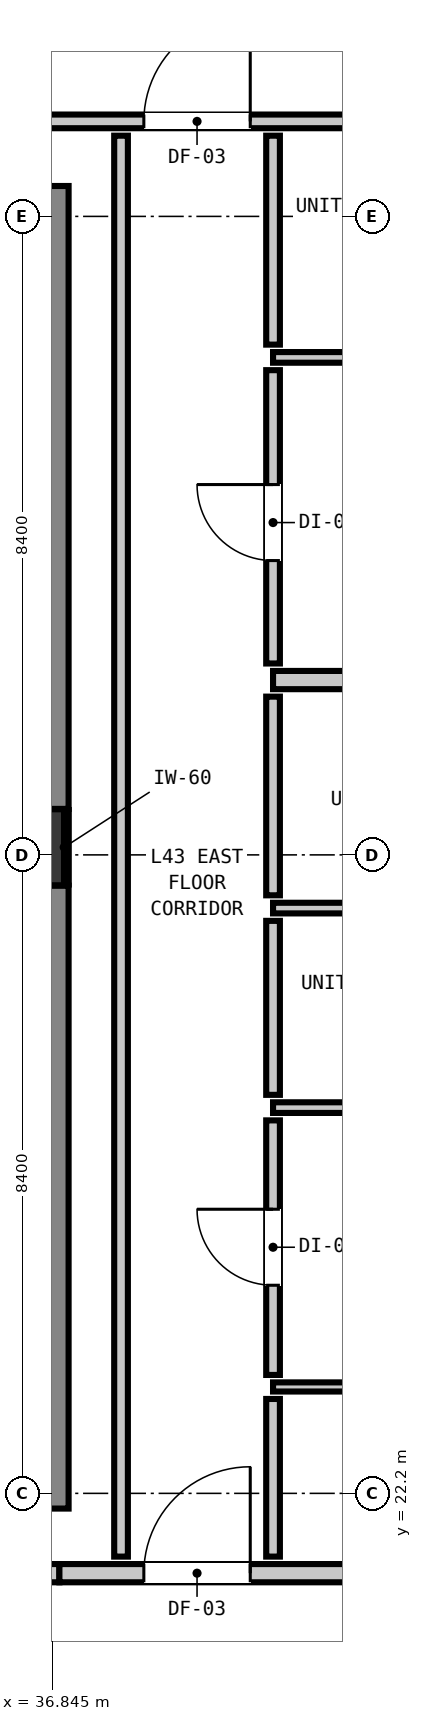
"""IFC4 building model, lengths in metres.
Left out: names, types, materials, properties, quantities, classifications, styles, units other than length and angle.
Written with IfcOpenShell. Run it as: python <this file> out.ifc"""

import sys

from ifc_helpers import new_model, si_unit, direction, frame, frame_2d, origin, origin_2d, place, context, subcontext, project, spatial, rectangle, extrude, element, fill, save


model = new_model("IFC4")
c1 = context("Model", 3, precision=1e-05, world=origin(), true_north=direction((0.0, 1.0)))
c2 = subcontext(c1, "Body", "Model", "MODEL_VIEW")
j1 = project(units=[si_unit("LENGTHUNIT", "METRE"), si_unit("PLANEANGLEUNIT", "RADIAN")], contexts=[c1])
p1 = place(None, origin())
s1 = spatial("IfcSite", under=j1, at=p1, CompositionType="ELEMENT")
p2 = place(p1, origin())
s2 = spatial("IfcBuilding", under=s1, at=p2, CompositionType="ELEMENT")
p3 = place(p2, frame((0.0, 0.0, 149.24)))
s3 = spatial("IfcBuildingStorey", under=s2, at=p3, CompositionType="ELEMENT", Elevation=149.24)
p4 = place(p3, frame((36.5, 30.7, 0.0), z_axis=(0.0, 0.0, 1.0), x_axis=(1.0, 0.0, 0.0)))
e1 = element("IfcColumn", 1, at=p4, inside=s3, PredefinedType="COLUMN", context=c2, shape_type="SweptSolid", body=[
    extrude(rectangle(XDim=1.0, YDim=1.0, at=origin_2d()), origin(), (0.0, 0.0, 1.0), 3.32),
])
p5 = place(p3, frame((36.56, 22.0, 0.0), z_axis=(0.0, 0.0, 1.0), x_axis=(0.0, 1.0, 0.0)))
e2 = element("IfcWall", 2, at=p5, inside=s3, PredefinedType="SHEAR", context=c2, shape_type="SweptSolid", body=[
    extrude(rectangle(XDim=8.195, YDim=1.0, at=frame_2d((4.098, 0.0))), origin(), (0.0, 0.0, 1.0), 3.32),
])
p6 = place(p3, frame((36.56, 31.205, 0.0), z_axis=(0.0, 0.0, 1.0), x_axis=(0.0, 1.0, 0.0)))
e3 = element("IfcWall", 3, at=p6, inside=s3, PredefinedType="SHEAR", context=c2, shape_type="SweptSolid", body=[
    extrude(rectangle(XDim=8.195, YDim=1.0, at=frame_2d((4.097, 0.0))), origin(), (0.0, 0.0, 1.0), 3.32),
])
p7 = place(p3, frame((9.407, 21.15, 0.0), z_axis=(0.0, 0.0, 1.0), x_axis=(1.0, 0.0, 0.0)))
e4 = element("IfcWall", 4, at=p7, inside=s3, PredefinedType="PARTITIONING", context=c2, shape_type="SweptSolid", body=[
    extrude(rectangle(XDim=27.532, YDim=0.24, at=frame_2d((13.766, 0.0))), origin(), (0.0, 0.0, 1.0), 3.08),
])
p8 = place(p7, frame((8.803, 0.0, 0.0)))
e5 = element("IfcOpeningElement", 5, at=p8, cuts=e4, PredefinedType="OPENING", context=c2, shape_type="SweptSolid", body=[
    extrude(rectangle(XDim=1.1, YDim=2.15, at=frame_2d((0.55, 1.075))), frame((0.0, 0.13, 0.0), z_axis=(0.0, -1.0, 0.0), x_axis=(1.0, 0.0, 0.0)), (0.0, 0.0, 1.0), 0.26),
])
p9 = place(p7, frame((1.192, 0.0, 0.0)))
e6 = element("IfcOpeningElement", 6, at=p9, cuts=e4, PredefinedType="OPENING", context=c2, shape_type="SweptSolid", body=[
    extrude(rectangle(XDim=1.4, YDim=2.15, at=frame_2d((0.7, 1.075))), frame((0.0, 0.13, 0.0), z_axis=(0.0, -1.0, 0.0), x_axis=(1.0, 0.0, 0.0)), (0.0, 0.0, 1.0), 0.26),
])
p10 = place(p3, frame((36.939, 21.15, 0.0), z_axis=(0.0, 0.0, 1.0), x_axis=(1.0, 0.0, 0.0)))
e7 = element("IfcWall", 7, at=p10, inside=s3, PredefinedType="PARTITIONING", context=c2, shape_type="SweptSolid", body=[
    extrude(rectangle(XDim=10.972, YDim=0.24, at=frame_2d((5.486, 0.0))), origin(), (0.0, 0.0, 1.0), 2.565),
])
p11 = place(p10, frame((1.111, 0.0, 0.0)))
e8 = element("IfcOpeningElement", 8, at=p11, cuts=e7, PredefinedType="OPENING", context=c2, shape_type="SweptSolid", body=[
    extrude(rectangle(XDim=1.4, YDim=2.15, at=frame_2d((0.7, 1.075))), frame((0.0, 0.13, 0.0), z_axis=(0.0, -1.0, 0.0), x_axis=(1.0, 0.0, 0.0)), (0.0, 0.0, 1.0), 0.26),
])
p12 = place(p3, frame((39.75, 32.9, 0.0), z_axis=(0.0, 0.0, 1.0), x_axis=(1.0, 0.0, 0.0)))
e9 = element("IfcWall", 9, at=p12, inside=s3, PredefinedType="PARTITIONING", context=c2, shape_type="SweptSolid", body=[
    extrude(rectangle(XDim=9.043, YDim=0.24, at=frame_2d((4.521, 0.0))), origin(), (0.0, 0.0, 1.0), 3.08),
])
p13 = place(p12, frame((4.075, 0.0, 0.0)))
e10 = element("IfcOpeningElement", 10, at=p13, cuts=e9, PredefinedType="OPENING", context=c2, shape_type="SweptSolid", body=[
    extrude(rectangle(XDim=0.9, YDim=2.1, at=frame_2d((0.45, 1.05))), frame((0.0, 0.13, 0.0), z_axis=(0.0, -1.0, 0.0), x_axis=(1.0, 0.0, 0.0)), (0.0, 0.0, 1.0), 0.26),
])
p14 = place(p3, frame((9.407, 40.25, 0.0), z_axis=(0.0, 0.0, 1.0), x_axis=(1.0, 0.0, 0.0)))
e11 = element("IfcWall", 11, at=p14, inside=s3, PredefinedType="PARTITIONING", context=c2, shape_type="SweptSolid", body=[
    extrude(rectangle(XDim=39.386, YDim=0.18, at=frame_2d((19.693, 0.0))), origin(), (0.0, 0.0, 1.0), 3.08),
])
p15 = place(p14, frame((8.028, 0.0, 0.0)))
e12 = element("IfcOpeningElement", 12, at=p15, cuts=e11, PredefinedType="OPENING", context=c2, shape_type="SweptSolid", body=[
    extrude(rectangle(XDim=1.4, YDim=2.15, at=frame_2d((0.7, 1.075))), frame((0.0, 0.1, 0.0), z_axis=(0.0, -1.0, 0.0), x_axis=(1.0, 0.0, 0.0)), (0.0, 0.0, 1.0), 0.2),
])
p16 = place(p14, frame((1.192, 0.0, 0.0)))
e13 = element("IfcOpeningElement", 13, at=p16, cuts=e11, PredefinedType="OPENING", context=c2, shape_type="SweptSolid", body=[
    extrude(rectangle(XDim=1.4, YDim=2.15, at=frame_2d((0.7, 1.075))), frame((0.0, 0.1, 0.0), z_axis=(0.0, -1.0, 0.0), x_axis=(1.0, 0.0, 0.0)), (0.0, 0.0, 1.0), 0.2),
])
p17 = place(p14, frame((28.643, 0.0, 0.0)))
e14 = element("IfcOpeningElement", 14, at=p17, cuts=e11, PredefinedType="OPENING", context=c2, shape_type="SweptSolid", body=[
    extrude(rectangle(XDim=1.4, YDim=2.15, at=frame_2d((0.7, 1.075))), frame((0.0, 0.1, 0.0), z_axis=(0.0, -1.0, 0.0), x_axis=(1.0, 0.0, 0.0)), (0.0, 0.0, 1.0), 0.2),
])
p18 = place(p3, frame((39.75, 27.275, 0.0), z_axis=(0.0, 0.0, 1.0), x_axis=(1.0, 0.0, 0.0)))
e15 = element("IfcWall", 15, at=p18, inside=s3, PredefinedType="PARTITIONING", context=c2, shape_type="SweptSolid", body=[
    extrude(rectangle(XDim=9.043, YDim=0.14, at=frame_2d((4.521, 0.0))), origin(), (0.0, 0.0, 1.0), 3.08),
])
p19 = place(p18, frame((1.708, 0.0, 0.0)))
e16 = element("IfcOpeningElement", 16, at=p19, cuts=e15, PredefinedType="OPENING", context=c2, shape_type="SweptSolid", body=[
    extrude(rectangle(XDim=0.86, YDim=2.02, at=frame_2d((0.43, 1.01))), frame((0.0, 0.08, 0.0), z_axis=(0.0, -1.0, 0.0), x_axis=(1.0, 0.0, 0.0)), (0.0, 0.0, 1.0), 0.16),
])
p20 = place(p18, frame((6.187, 0.0, 0.0)))
e17 = element("IfcOpeningElement", 17, at=p20, cuts=e15, PredefinedType="OPENING", context=c2, shape_type="SweptSolid", body=[
    extrude(rectangle(XDim=0.9, YDim=2.1, at=frame_2d((0.45, 1.05))), frame((0.0, 0.08, 0.0), z_axis=(0.0, -1.0, 0.0), x_axis=(1.0, 0.0, 0.0)), (0.0, 0.0, 1.0), 0.16),
])
p21 = place(p3, frame((39.75, 29.9, 0.0), z_axis=(0.0, 0.0, 1.0), x_axis=(1.0, 0.0, 0.0)))
e18 = element("IfcWall", 18, at=p21, inside=s3, PredefinedType="PARTITIONING", context=c2, shape_type="SweptSolid", body=[
    extrude(rectangle(XDim=9.043, YDim=0.14, at=frame_2d((4.521, 0.0))), origin(), (0.0, 0.0, 1.0), 3.08),
])
p22 = place(p3, frame((39.75, 37.145, 0.0), z_axis=(0.0, 0.0, 1.0), x_axis=(1.0, 0.0, 0.0)))
e19 = element("IfcWall", 19, at=p22, inside=s3, PredefinedType="PARTITIONING", context=c2, shape_type="SweptSolid", body=[
    extrude(rectangle(XDim=9.043, YDim=0.14, at=frame_2d((4.521, 0.0))), origin(), (0.0, 0.0, 1.0), 3.08),
])
p23 = place(p22, frame((1.708, 0.0, 0.0)))
e20 = element("IfcOpeningElement", 20, at=p23, cuts=e19, PredefinedType="OPENING", context=c2, shape_type="SweptSolid", body=[
    extrude(rectangle(XDim=0.86, YDim=2.02, at=frame_2d((0.43, 1.01))), frame((0.0, 0.08, 0.0), z_axis=(0.0, -1.0, 0.0), x_axis=(1.0, 0.0, 0.0)), (0.0, 0.0, 1.0), 0.16),
])
p24 = place(p22, frame((6.187, 0.0, 0.0)))
e21 = element("IfcOpeningElement", 21, at=p24, cuts=e19, PredefinedType="OPENING", context=c2, shape_type="SweptSolid", body=[
    extrude(rectangle(XDim=0.9, YDim=2.1, at=frame_2d((0.45, 1.05))), frame((0.0, 0.08, 0.0), z_axis=(0.0, -1.0, 0.0), x_axis=(1.0, 0.0, 0.0)), (0.0, 0.0, 1.0), 0.16),
])
p25 = place(p3, frame((39.75, 23.6, 0.0), z_axis=(0.0, 0.0, 1.0), x_axis=(1.0, 0.0, 0.0)))
e22 = element("IfcWall", 22, at=p25, inside=s3, PredefinedType="PARTITIONING", context=c2, shape_type="SweptSolid", body=[
    extrude(rectangle(XDim=9.043, YDim=0.12, at=frame_2d((4.521, 0.0))), origin(), (0.0, 0.0, 1.0), 3.08),
])
p26 = place(p25, frame((4.075, 0.0, 0.0)))
e23 = element("IfcOpeningElement", 23, at=p26, cuts=e22, PredefinedType="OPENING", context=c2, shape_type="SweptSolid", body=[
    extrude(rectangle(XDim=0.9, YDim=2.1, at=frame_2d((0.45, 1.05))), frame((0.0, 0.07, 0.0), z_axis=(0.0, -1.0, 0.0), x_axis=(1.0, 0.0, 0.0)), (0.0, 0.0, 1.0), 0.14),
])
p27 = place(p3, frame((37.75, 21.368, 0.0), z_axis=(0.0, 0.0, 1.0), x_axis=(0.0, 1.0, 0.0)))
e24 = element("IfcWall", 24, at=p27, inside=s3, PredefinedType="PARTITIONING", context=c2, shape_type="SweptSolid", body=[
    extrude(rectangle(XDim=18.694, YDim=0.18, at=frame_2d((9.347, 0.0))), origin(), (0.0, 0.0, 1.0), 3.08),
])
p28 = place(p3, frame((39.75, 21.368, 0.0), z_axis=(0.0, 0.0, 1.0), x_axis=(0.0, 1.0, 0.0)))
e25 = element("IfcWall", 25, at=p28, inside=s3, PredefinedType="PARTITIONING", context=c2, shape_type="SweptSolid", body=[
    extrude(rectangle(XDim=2.074, YDim=0.18, at=frame_2d((1.037, 0.0))), origin(), (0.0, 0.0, 1.0), 3.08),
])
p29 = place(p3, frame((39.75, 23.758, 0.0), z_axis=(0.0, 0.0, 1.0), x_axis=(0.0, 1.0, 0.0)))
e26 = element("IfcWall", 26, at=p29, inside=s3, PredefinedType="PARTITIONING", context=c2, shape_type="SweptSolid", body=[
    extrude(rectangle(XDim=3.349, YDim=0.18, at=frame_2d((1.674, 0.0))), origin(), (0.0, 0.0, 1.0), 3.08),
])
p30 = place(p29, frame((1.18, 0.0, 0.0)))
e27 = element("IfcOpeningElement", 27, at=p30, cuts=e26, PredefinedType="OPENING", context=c2, shape_type="SweptSolid", body=[
    extrude(rectangle(XDim=1.0, YDim=2.15, at=frame_2d((0.5, 1.075))), frame((0.0, 0.1, 0.0), z_axis=(0.0, -1.0, 0.0), x_axis=(1.0, 0.0, 0.0)), (0.0, 0.0, 1.0), 0.2),
])
p31 = place(p3, frame((39.75, 27.443, 0.0), z_axis=(0.0, 0.0, 1.0), x_axis=(0.0, 1.0, 0.0)))
e28 = element("IfcWall", 28, at=p31, inside=s3, PredefinedType="PARTITIONING", context=c2, shape_type="SweptSolid", body=[
    extrude(rectangle(XDim=2.289, YDim=0.18, at=frame_2d((1.145, 0.0))), origin(), (0.0, 0.0, 1.0), 3.08),
])
p32 = place(p3, frame((39.75, 30.068, 0.0), z_axis=(0.0, 0.0, 1.0), x_axis=(0.0, 1.0, 0.0)))
e29 = element("IfcWall", 29, at=p32, inside=s3, PredefinedType="PARTITIONING", context=c2, shape_type="SweptSolid", body=[
    extrude(rectangle(XDim=2.614, YDim=0.18, at=frame_2d((1.307, 0.0))), origin(), (0.0, 0.0, 1.0), 3.08),
])
p33 = place(p3, frame((39.75, 33.118, 0.0), z_axis=(0.0, 0.0, 1.0), x_axis=(0.0, 1.0, 0.0)))
e30 = element("IfcWall", 30, at=p33, inside=s3, PredefinedType="PARTITIONING", context=c2, shape_type="SweptSolid", body=[
    extrude(rectangle(XDim=3.859, YDim=0.18, at=frame_2d((1.93, 0.0))), origin(), (0.0, 0.0, 1.0), 3.08),
])
p34 = place(p33, frame((1.354, 0.0, 0.0)))
e31 = element("IfcOpeningElement", 31, at=p34, cuts=e30, PredefinedType="OPENING", context=c2, shape_type="SweptSolid", body=[
    extrude(rectangle(XDim=1.0, YDim=2.15, at=frame_2d((0.5, 1.075))), frame((0.0, 0.1, 0.0), z_axis=(0.0, -1.0, 0.0), x_axis=(1.0, 0.0, 0.0)), (0.0, 0.0, 1.0), 0.2),
])
p35 = place(p3, frame((39.75, 37.313, 0.0), z_axis=(0.0, 0.0, 1.0), x_axis=(0.0, 1.0, 0.0)))
e32 = element("IfcWall", 32, at=p35, inside=s3, PredefinedType="PARTITIONING", context=c2, shape_type="SweptSolid", body=[
    extrude(rectangle(XDim=2.749, YDim=0.18, at=frame_2d((1.375, 0.0))), origin(), (0.0, 0.0, 1.0), 3.08),
])
p36 = place(p3, frame((37.032, 30.21, 0.0), z_axis=(0.0, 0.0, 1.0), x_axis=(0.0, 1.0, 0.0)))
e33 = element("IfcWall", 33, at=p36, inside=s3, PredefinedType="PARTITIONING", context=c2, shape_type="SweptSolid", body=[
    extrude(rectangle(XDim=0.98, YDim=0.06, at=frame_2d((0.49, 0.0))), origin(), (0.0, 0.0, 1.0), 1.45),
])
p37 = place(p11, origin())
e34 = element("IfcDoor", 34, at=p37, inside=s3, OperationType="SINGLE_SWING_RIGHT", PredefinedType="DOOR", context=c2, shape_type="SweptSolid", body=[
    extrude(rectangle(XDim=1.4, YDim=2.15, at=frame_2d((0.7, 1.075))), frame((0.0, 0.025, 0.0), z_axis=(0.0, -1.0, 0.0), x_axis=(1.0, 0.0, 0.0)), (0.0, 0.0, 1.0), 0.05),
])
fill(e8, e34)
p38 = place(p17, origin())
e35 = element("IfcDoor", 35, at=p38, inside=s3, OperationType="SINGLE_SWING_RIGHT", PredefinedType="DOOR", context=c2, shape_type="SweptSolid", body=[
    extrude(rectangle(XDim=1.4, YDim=2.15, at=frame_2d((0.7, 1.075))), frame((0.0, 0.025, 0.0), z_axis=(0.0, -1.0, 0.0), x_axis=(1.0, 0.0, 0.0)), (0.0, 0.0, 1.0), 0.05),
])
fill(e14, e35)
p39 = place(p30, origin())
e36 = element("IfcDoor", 36, at=p39, inside=s3, OperationType="SINGLE_SWING_RIGHT", PredefinedType="DOOR", context=c2, shape_type="SweptSolid", body=[
    extrude(rectangle(XDim=1.0, YDim=2.15, at=frame_2d((0.5, 1.075))), frame((0.0, 0.025, 0.0), z_axis=(0.0, -1.0, 0.0), x_axis=(1.0, 0.0, 0.0)), (0.0, 0.0, 1.0), 0.05),
])
fill(e27, e36)
p40 = place(p34, origin())
e37 = element("IfcDoor", 37, at=p40, inside=s3, OperationType="SINGLE_SWING_RIGHT", PredefinedType="DOOR", context=c2, shape_type="SweptSolid", body=[
    extrude(rectangle(XDim=1.0, YDim=2.15, at=frame_2d((0.5, 1.075))), frame((0.0, 0.025, 0.0), z_axis=(0.0, -1.0, 0.0), x_axis=(1.0, 0.0, 0.0)), (0.0, 0.0, 1.0), 0.05),
])
fill(e31, e37)
save(model, sys.argv[1])
